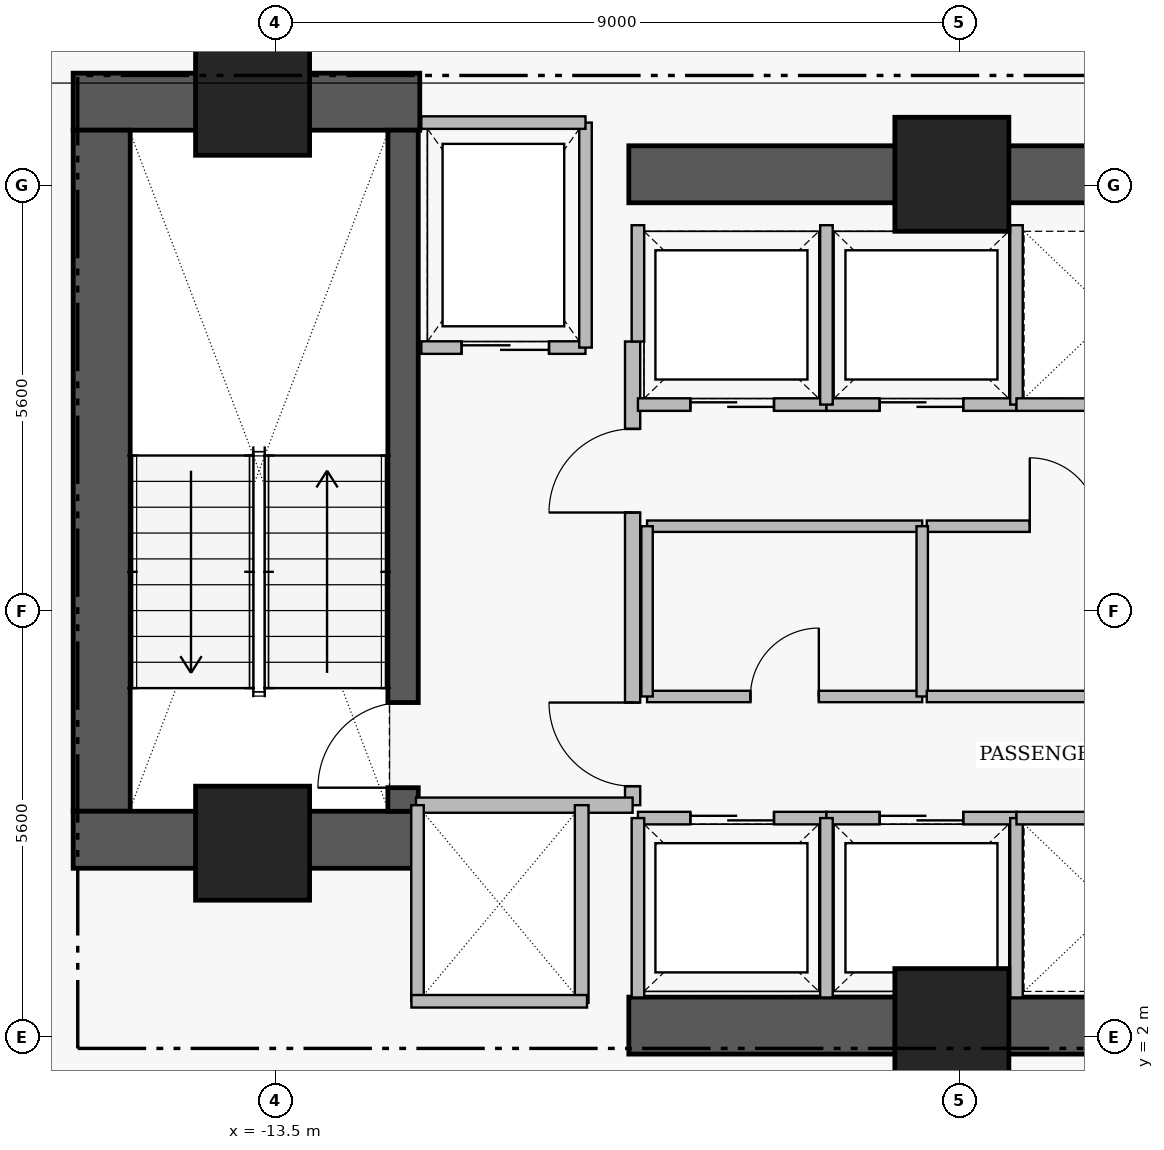
"""IFC4 building model, lengths in metres.
Left out: names, types, materials, properties, quantities, classifications, styles, units other than length and angle.
Written with IfcOpenShell. Run it as: python <this file> out.ifc"""

import sys

from ifc_helpers import new_model, si_unit, direction, frame, frame_2d, origin, origin_2d, place, context, subcontext, project, spatial, rectangle, extrude, element, fill, save


model = new_model("IFC4")
c1 = context("Model", 3, precision=1e-05, world=origin(), true_north=direction((0.0, 1.0)))
c2 = subcontext(c1, "Body", "Model", "MODEL_VIEW")
j1 = project(units=[si_unit("LENGTHUNIT", "METRE"), si_unit("PLANEANGLEUNIT", "RADIAN")], contexts=[c1])
p1 = place(None, origin())
s1 = spatial("IfcSite", under=j1, at=p1, CompositionType="ELEMENT")
p2 = place(p1, origin())
s2 = spatial("IfcBuilding", under=s1, at=p2, CompositionType="ELEMENT")
p3 = place(p2, frame((0.0, 0.0, 139.45)))
s3 = spatial("IfcBuildingStorey", under=s2, at=p3, CompositionType="ELEMENT", Elevation=139.45)
p4 = place(p3, frame((-16.16, 14.305, 0.0), z_axis=(0.0, 0.0, 1.0), x_axis=(1.0, 0.0, 0.0)))
e1 = element("IfcWall", 1, at=p4, inside=s3, PredefinedType="SHEAR", context=c2, shape_type="SweptSolid", body=[
    extrude(rectangle(XDim=4.56, YDim=0.75, at=frame_2d((2.28, 0.0))), origin(), (0.0, 0.0, 1.0), 3.46),
])
p5 = place(p3, frame((-15.785, 4.97, 0.0), z_axis=(0.0, 0.0, 1.0), x_axis=(0.0, 1.0, 0.0)))
e2 = element("IfcWall", 2, at=p5, inside=s3, PredefinedType="SHEAR", context=c2, shape_type="SweptSolid", body=[
    extrude(rectangle(XDim=8.96, YDim=0.75, at=frame_2d((4.48, 0.0))), origin(), (0.0, 0.0, 1.0), 3.46),
])
p6 = place(p3, frame((-16.16, 4.595, 0.0), z_axis=(0.0, 0.0, 1.0), x_axis=(1.0, 0.0, 0.0)))
e3 = element("IfcWall", 3, at=p6, inside=s3, PredefinedType="SHEAR", context=c2, shape_type="SweptSolid", body=[
    extrude(rectangle(XDim=4.56, YDim=0.75, at=frame_2d((2.28, 0.0))), origin(), (0.0, 0.0, 1.0), 3.46),
])
for number, where, z_axis, x_axis in (
    (4, (-8.85, 2.15, 0.0), (0.0, 0.0, 1.0), (1.0, 0.0, 0.0)),
    (5, (-8.85, 13.35, 0.0), (0.0, 0.0, 1.0), (1.0, 0.0, 0.0)),
):
    element("IfcWall", number, at=place(p3, frame(where, z_axis=z_axis, x_axis=x_axis)), inside=s3, PredefinedType="SHEAR", context=c2, shape_type="SweptSolid", body=[
        extrude(rectangle(XDim=7.6, YDim=0.75, at=frame_2d((3.8, 0.0))), origin(), (0.0, 0.0, 1.0), 3.43),
    ])
p7 = place(p3, frame((-11.82, 4.97, 0.0), z_axis=(0.0, 0.0, 1.0), x_axis=(0.0, 1.0, 0.0)))
e6 = element("IfcWall", 6, at=p7, inside=s3, PredefinedType="SHEAR", context=c2, shape_type="SweptSolid", body=[
    extrude(rectangle(XDim=8.96, YDim=0.4, at=frame_2d((4.48, 0.0))), origin(), (0.0, 0.0, 1.0), 3.46),
])
p8 = place(p7, frame((0.31, 0.0, 0.0)))
e7 = element("IfcOpeningElement", 7, at=p8, cuts=e6, PredefinedType="OPENING", context=c2, shape_type="SweptSolid", body=[
    extrude(rectangle(XDim=1.12, YDim=2.22, at=frame_2d((0.56, 1.11))), frame((0.0, 0.21, 0.0), z_axis=(0.0, -1.0, 0.0), x_axis=(1.0, 0.0, 0.0)), (0.0, 0.0, 1.0), 0.42),
])
for number, where, z_axis, x_axis in (
    (8, (-13.8, 14.35, 0.0), (0.0, 0.0, 1.0), (1.0, 0.0, 0.0)),
    (9, (-4.6, 13.35, 0.0), (0.0, 0.0, 1.0), (1.0, 0.0, 0.0)),
    (10, (-13.8, 4.55, 0.0), (0.0, 0.0, 1.0), (1.0, 0.0, 0.0)),
    (11, (-4.6, 2.15, 0.0), (0.0, 0.0, 1.0), (1.0, 0.0, 0.0)),
):
    element("IfcColumn", number, at=place(p3, frame(where, z_axis=z_axis, x_axis=x_axis)), inside=s3, PredefinedType="COLUMN", context=c2, shape_type="SweptSolid", body=[
        extrude(rectangle(XDim=1.5, YDim=1.5, at=origin_2d()), origin(), (0.0, 0.0, 1.0), 3.65),
    ])
p9 = place(p3, frame((-8.8, 5.05, 0.0), z_axis=(0.0, 0.0, 1.0), x_axis=(0.0, 1.0, 0.0)))
e12 = element("IfcWall", 12, at=p9, inside=s3, PredefinedType="PARTITIONING", context=c2, shape_type="SweptSolid", body=[
    extrude(rectangle(XDim=6.1, YDim=0.2, at=frame_2d((3.05, 0.0))), origin(), (0.0, 0.0, 1.0), 3.43),
])
p10 = place(p9, frame((0.25, 0.0, 0.0)))
e13 = element("IfcOpeningElement", 13, at=p10, cuts=e12, PredefinedType="OPENING", context=c2, shape_type="SweptSolid", body=[
    extrude(rectangle(XDim=1.1, YDim=2.2, at=frame_2d((0.55, 1.1))), frame((0.0, 0.11, 0.0), z_axis=(0.0, -1.0, 0.0), x_axis=(1.0, 0.0, 0.0)), (0.0, 0.0, 1.0), 0.22),
])
p11 = place(p9, frame((3.85, 0.0, 0.0)))
e14 = element("IfcOpeningElement", 14, at=p11, cuts=e12, PredefinedType="OPENING", context=c2, shape_type="SweptSolid", body=[
    extrude(rectangle(XDim=1.1, YDim=2.2, at=frame_2d((0.55, 1.1))), frame((0.0, 0.11, 0.0), z_axis=(0.0, -1.0, 0.0), x_axis=(1.0, 0.0, 0.0)), (0.0, 0.0, 1.0), 0.22),
])
p12 = place(p3, frame((-11.58, 11.07, 0.0), z_axis=(0.0, 0.0, 1.0), x_axis=(1.0, 0.0, 0.0)))
e15 = element("IfcWall", 15, at=p12, inside=s3, PredefinedType="PARTITIONING", context=c2, shape_type="SweptSolid", body=[
    extrude(rectangle(XDim=2.16, YDim=0.165, at=frame_2d((1.08, 0.0))), origin(), (0.0, 0.0, 1.0), 3.43),
])
p13 = place(p12, frame((0.53, 0.0, 0.0)))
e16 = element("IfcOpeningElement", 16, at=p13, cuts=e15, PredefinedType="OPENING", context=c2, shape_type="SweptSolid", body=[
    extrude(rectangle(XDim=1.15, YDim=2.25, at=frame_2d((0.575, 1.125))), frame((0.0, 0.093, 0.0), z_axis=(0.0, -1.0, 0.0), x_axis=(1.0, 0.0, 0.0)), (0.0, 0.0, 1.0), 0.185),
])
p14 = place(p3, frame((-8.73, 4.88, 0.0), z_axis=(0.0, 0.0, 1.0), x_axis=(1.0, 0.0, 0.0)))
e17 = element("IfcWall", 17, at=p14, inside=s3, PredefinedType="PARTITIONING", context=c2, shape_type="SweptSolid", body=[
    extrude(rectangle(XDim=2.48, YDim=0.165, at=frame_2d((1.24, 0.0))), origin(), (0.0, 0.0, 1.0), 3.43),
])
p15 = place(p14, frame((0.69, 0.0, 0.0)))
e18 = element("IfcOpeningElement", 18, at=p15, cuts=e17, PredefinedType="OPENING", context=c2, shape_type="SweptSolid", body=[
    extrude(rectangle(XDim=1.1, YDim=2.25, at=frame_2d((0.55, 1.125))), frame((0.0, 0.093, 0.0), z_axis=(0.0, -1.0, 0.0), x_axis=(1.0, 0.0, 0.0)), (0.0, 0.0, 1.0), 0.185),
])
p16 = place(p3, frame((-6.25, 4.88, 0.0), z_axis=(0.0, 0.0, 1.0), x_axis=(1.0, 0.0, 0.0)))
e19 = element("IfcWall", 19, at=p16, inside=s3, PredefinedType="PARTITIONING", context=c2, shape_type="SweptSolid", body=[
    extrude(rectangle(XDim=2.5, YDim=0.165, at=frame_2d((1.25, 0.0))), origin(), (0.0, 0.0, 1.0), 3.43),
])
p17 = place(p16, frame((0.7, 0.0, 0.0)))
e20 = element("IfcOpeningElement", 20, at=p17, cuts=e19, PredefinedType="OPENING", context=c2, shape_type="SweptSolid", body=[
    extrude(rectangle(XDim=1.1, YDim=2.25, at=frame_2d((0.55, 1.125))), frame((0.0, 0.093, 0.0), z_axis=(0.0, -1.0, 0.0), x_axis=(1.0, 0.0, 0.0)), (0.0, 0.0, 1.0), 0.185),
])
p18 = place(p3, frame((-8.73, 10.32, 0.0), z_axis=(0.0, 0.0, 1.0), x_axis=(1.0, 0.0, 0.0)))
e21 = element("IfcWall", 21, at=p18, inside=s3, PredefinedType="PARTITIONING", context=c2, shape_type="SweptSolid", body=[
    extrude(rectangle(XDim=2.48, YDim=0.165, at=frame_2d((1.24, 0.0))), origin(), (0.0, 0.0, 1.0), 3.43),
])
p19 = place(p18, frame((0.69, 0.0, 0.0)))
e22 = element("IfcOpeningElement", 22, at=p19, cuts=e21, PredefinedType="OPENING", context=c2, shape_type="SweptSolid", body=[
    extrude(rectangle(XDim=1.1, YDim=2.25, at=frame_2d((0.55, 1.125))), frame((0.0, 0.093, 0.0), z_axis=(0.0, -1.0, 0.0), x_axis=(1.0, 0.0, 0.0)), (0.0, 0.0, 1.0), 0.185),
])
p20 = place(p3, frame((-6.25, 10.32, 0.0), z_axis=(0.0, 0.0, 1.0), x_axis=(1.0, 0.0, 0.0)))
e23 = element("IfcWall", 23, at=p20, inside=s3, PredefinedType="PARTITIONING", context=c2, shape_type="SweptSolid", body=[
    extrude(rectangle(XDim=2.5, YDim=0.165, at=frame_2d((1.25, 0.0))), origin(), (0.0, 0.0, 1.0), 3.43),
])
p21 = place(p20, frame((0.7, 0.0, 0.0)))
e24 = element("IfcOpeningElement", 24, at=p21, cuts=e23, PredefinedType="OPENING", context=c2, shape_type="SweptSolid", body=[
    extrude(rectangle(XDim=1.1, YDim=2.25, at=frame_2d((0.55, 1.125))), frame((0.0, 0.093, 0.0), z_axis=(0.0, -1.0, 0.0), x_axis=(1.0, 0.0, 0.0)), (0.0, 0.0, 1.0), 0.185),
])
p22 = place(p3, frame((-8.61, 6.48, 0.0), z_axis=(0.0, 0.0, 1.0), x_axis=(1.0, 0.0, 0.0)))
e25 = element("IfcWall", 25, at=p22, inside=s3, PredefinedType="PARTITIONING", context=c2, shape_type="SweptSolid", body=[
    extrude(rectangle(XDim=3.62, YDim=0.15, at=frame_2d((1.81, 0.0))), origin(), (0.0, 0.0, 1.0), 3.43),
])
p23 = place(p22, frame((1.36, 0.0, 0.0)))
e26 = element("IfcOpeningElement", 26, at=p23, cuts=e25, PredefinedType="OPENING", context=c2, shape_type="SweptSolid", body=[
    extrude(rectangle(XDim=0.9, YDim=2.15, at=frame_2d((0.45, 1.075))), frame((0.0, 0.085, 0.0), z_axis=(0.0, -1.0, 0.0), x_axis=(1.0, 0.0, 0.0)), (0.0, 0.0, 1.0), 0.17),
])
p24 = place(p3, frame((-4.93, 8.72, 0.0), z_axis=(0.0, 0.0, 1.0), x_axis=(1.0, 0.0, 0.0)))
e27 = element("IfcWall", 27, at=p24, inside=s3, PredefinedType="PARTITIONING", context=c2, shape_type="SweptSolid", body=[
    extrude(rectangle(XDim=3.61, YDim=0.15, at=frame_2d((1.805, 0.0))), origin(), (0.0, 0.0, 1.0), 3.43),
])
p25 = place(p24, frame((1.355, 0.0, 0.0)))
e28 = element("IfcOpeningElement", 28, at=p25, cuts=e27, PredefinedType="OPENING", context=c2, shape_type="SweptSolid", body=[
    extrude(rectangle(XDim=0.9, YDim=2.15, at=frame_2d((0.45, 1.075))), frame((0.0, 0.085, 0.0), z_axis=(0.0, -1.0, 0.0), x_axis=(1.0, 0.0, 0.0)), (0.0, 0.0, 1.0), 0.17),
])
p26 = place(p3, frame((-11.65, 5.05, 0.0), z_axis=(0.0, 0.0, 1.0), x_axis=(1.0, 0.0, 0.0)))
e29 = element("IfcWall", 29, at=p26, inside=s3, PredefinedType="PARTITIONING", context=c2, shape_type="SweptSolid", body=[
    extrude(rectangle(XDim=2.85, YDim=0.2, at=frame_2d((1.425, 0.0))), origin(), (0.0, 0.0, 1.0), 3.43),
])
p27 = place(p3, frame((-9.42, 11.07, 0.0), z_axis=(0.0, 0.0, 1.0), x_axis=(0.0, 1.0, 0.0)))
e30 = element("IfcWall", 30, at=p27, inside=s3, PredefinedType="PARTITIONING", context=c2, shape_type="SweptSolid", body=[
    extrude(rectangle(XDim=2.96, YDim=0.165, at=frame_2d((1.48, 0.0))), origin(), (0.0, 0.0, 1.0), 3.43),
])
p28 = place(p3, frame((-11.58, 14.03, 0.0), z_axis=(0.0, 0.0, 1.0), x_axis=(1.0, 0.0, 0.0)))
e31 = element("IfcWall", 31, at=p28, inside=s3, PredefinedType="PARTITIONING", context=c2, shape_type="SweptSolid", body=[
    extrude(rectangle(XDim=2.16, YDim=0.165, at=frame_2d((1.08, 0.0))), origin(), (0.0, 0.0, 1.0), 3.43),
])
for number, where, z_axis, x_axis in (
    (32, (-8.73, 2.52, 0.0), (0.0, 0.0, 1.0), (0.0, 1.0, 0.0)),
    (33, (-6.25, 2.52, 0.0), (0.0, 0.0, 1.0), (0.0, 1.0, 0.0)),
    (34, (-3.75, 2.52, 0.0), (0.0, 0.0, 1.0), (0.0, 1.0, 0.0)),
):
    element("IfcWall", number, at=place(p3, frame(where, z_axis=z_axis, x_axis=x_axis)), inside=s3, PredefinedType="PARTITIONING", context=c2, shape_type="SweptSolid", body=[
        extrude(rectangle(XDim=2.36, YDim=0.165, at=frame_2d((1.18, 0.0))), origin(), (0.0, 0.0, 1.0), 3.43),
    ])
p29 = place(p3, frame((-8.73, 11.15, 0.0), z_axis=(0.0, 0.0, 1.0), x_axis=(0.0, 1.0, 0.0)))
e35 = element("IfcWall", 35, at=p29, inside=s3, PredefinedType="PARTITIONING", context=c2, shape_type="SweptSolid", body=[
    extrude(rectangle(XDim=1.53, YDim=0.165, at=frame_2d((0.765, 0.0))), origin(), (0.0, 0.0, 1.0), 3.43),
])
for number, where, z_axis, x_axis in (
    (36, (-6.25, 10.32, 0.0), (0.0, 0.0, 1.0), (0.0, 1.0, 0.0)),
    (37, (-3.75, 10.32, 0.0), (0.0, 0.0, 1.0), (0.0, 1.0, 0.0)),
):
    element("IfcWall", number, at=place(p3, frame(where, z_axis=z_axis, x_axis=x_axis)), inside=s3, PredefinedType="PARTITIONING", context=c2, shape_type="SweptSolid", body=[
        extrude(rectangle(XDim=2.36, YDim=0.165, at=frame_2d((1.18, 0.0))), origin(), (0.0, 0.0, 1.0), 3.43),
    ])
for number, where, z_axis, x_axis in (
    (38, (-3.75, 4.88, 0.0), (0.0, 0.0, 1.0), (1.0, 0.0, 0.0)),
    (39, (-3.75, 10.32, 0.0), (0.0, 0.0, 1.0), (1.0, 0.0, 0.0)),
):
    element("IfcWall", number, at=place(p3, frame(where, z_axis=z_axis, x_axis=x_axis)), inside=s3, PredefinedType="PARTITIONING", context=c2, shape_type="SweptSolid", body=[
        extrude(rectangle(XDim=2.48, YDim=0.165, at=frame_2d((1.24, 0.0))), origin(), (0.0, 0.0, 1.0), 3.43),
    ])
p30 = place(p3, frame((-9.47, 2.45, 0.0), z_axis=(0.0, 0.0, 1.0), x_axis=(0.0, 1.0, 0.0)))
e40 = element("IfcWall", 40, at=p30, inside=s3, PredefinedType="PARTITIONING", context=c2, shape_type="SweptSolid", body=[
    extrude(rectangle(XDim=2.6, YDim=0.18, at=frame_2d((1.3, 0.0))), origin(), (0.0, 0.0, 1.0), 3.43),
])
p31 = place(p3, frame((-11.63, 2.47, 0.0), z_axis=(0.0, 0.0, 1.0), x_axis=(0.0, 1.0, 0.0)))
e41 = element("IfcWall", 41, at=p31, inside=s3, PredefinedType="PARTITIONING", context=c2, shape_type="SweptSolid", body=[
    extrude(rectangle(XDim=2.58, YDim=0.165, at=frame_2d((1.29, 0.0))), origin(), (0.0, 0.0, 1.0), 3.43),
])
p32 = place(p3, frame((-11.71, 2.47, 0.0), z_axis=(0.0, 0.0, 1.0), x_axis=(1.0, 0.0, 0.0)))
e42 = element("IfcWall", 42, at=p32, inside=s3, PredefinedType="PARTITIONING", context=c2, shape_type="SweptSolid", body=[
    extrude(rectangle(XDim=2.31, YDim=0.165, at=frame_2d((1.155, 0.0))), origin(), (0.0, 0.0, 1.0), 2.03),
])
p33 = place(p3, frame((-8.61, 8.72, 0.0), z_axis=(0.0, 0.0, 1.0), x_axis=(1.0, 0.0, 0.0)))
e43 = element("IfcWall", 43, at=p33, inside=s3, PredefinedType="PARTITIONING", context=c2, shape_type="SweptSolid", body=[
    extrude(rectangle(XDim=3.62, YDim=0.15, at=frame_2d((1.81, 0.0))), origin(), (0.0, 0.0, 1.0), 3.43),
])
for number, where, z_axis, x_axis in (
    (44, (-8.61, 6.48, 0.0), (0.0, 0.0, 1.0), (0.0, 1.0, 0.0)),
    (45, (-4.99, 6.48, 0.0), (0.0, 0.0, 1.0), (0.0, 1.0, 0.0)),
):
    element("IfcWall", number, at=place(p3, frame(where, z_axis=z_axis, x_axis=x_axis)), inside=s3, PredefinedType="PARTITIONING", context=c2, shape_type="SweptSolid", body=[
        extrude(rectangle(XDim=2.24, YDim=0.15, at=frame_2d((1.12, 0.0))), origin(), (0.0, 0.0, 1.0), 3.43),
    ])
p34 = place(p3, frame((-4.93, 6.48, 0.0), z_axis=(0.0, 0.0, 1.0), x_axis=(1.0, 0.0, 0.0)))
e46 = element("IfcWall", 46, at=p34, inside=s3, PredefinedType="PARTITIONING", context=c2, shape_type="SweptSolid", body=[
    extrude(rectangle(XDim=3.61, YDim=0.15, at=frame_2d((1.805, 0.0))), origin(), (0.0, 0.0, 1.0), 3.43),
])
p35 = place(p8, origin())
e47 = element("IfcDoor", 47, at=p35, inside=s3, OperationType="SINGLE_SWING_LEFT", PredefinedType="DOOR", context=c2, shape_type="SweptSolid", body=[
    extrude(rectangle(XDim=1.12, YDim=2.22, at=frame_2d((0.56, 1.11))), frame((0.0, 0.025, 0.0), z_axis=(0.0, -1.0, 0.0), x_axis=(1.0, 0.0, 0.0)), (0.0, 0.0, 1.0), 0.05),
])
fill(e7, e47)
p36 = place(p10, origin())
e48 = element("IfcDoor", 48, at=p36, inside=s3, OperationType="SINGLE_SWING_RIGHT", PredefinedType="DOOR", context=c2, shape_type="SweptSolid", body=[
    extrude(rectangle(XDim=1.1, YDim=2.2, at=frame_2d((0.55, 1.1))), frame((0.0, 0.025, 0.0), z_axis=(0.0, -1.0, 0.0), x_axis=(1.0, 0.0, 0.0)), (0.0, 0.0, 1.0), 0.05),
])
fill(e13, e48)
p37 = place(p11, origin())
e49 = element("IfcDoor", 49, at=p37, inside=s3, OperationType="SINGLE_SWING_LEFT", PredefinedType="DOOR", context=c2, shape_type="SweptSolid", body=[
    extrude(rectangle(XDim=1.1, YDim=2.2, at=frame_2d((0.55, 1.1))), frame((0.0, 0.025, 0.0), z_axis=(0.0, -1.0, 0.0), x_axis=(1.0, 0.0, 0.0)), (0.0, 0.0, 1.0), 0.05),
])
fill(e14, e49)
p38 = place(p13, origin())
e50 = element("IfcDoor", 50, at=p38, inside=s3, OperationType="SLIDING_TO_LEFT", PredefinedType="DOOR", context=c2, shape_type="SweptSolid", body=[
    extrude(rectangle(XDim=1.15, YDim=2.25, at=frame_2d((0.575, 1.125))), frame((0.0, 0.025, 0.0), z_axis=(0.0, -1.0, 0.0), x_axis=(1.0, 0.0, 0.0)), (0.0, 0.0, 1.0), 0.05),
])
fill(e16, e50)
p39 = place(p15, origin())
e51 = element("IfcDoor", 51, at=p39, inside=s3, OperationType="SLIDING_TO_LEFT", PredefinedType="DOOR", context=c2, shape_type="SweptSolid", body=[
    extrude(rectangle(XDim=1.1, YDim=2.25, at=frame_2d((0.55, 1.125))), frame((0.0, 0.025, 0.0), z_axis=(0.0, -1.0, 0.0), x_axis=(1.0, 0.0, 0.0)), (0.0, 0.0, 1.0), 0.05),
])
fill(e18, e51)
p40 = place(p17, origin())
e52 = element("IfcDoor", 52, at=p40, inside=s3, OperationType="SLIDING_TO_LEFT", PredefinedType="DOOR", context=c2, shape_type="SweptSolid", body=[
    extrude(rectangle(XDim=1.1, YDim=2.25, at=frame_2d((0.55, 1.125))), frame((0.0, 0.025, 0.0), z_axis=(0.0, -1.0, 0.0), x_axis=(1.0, 0.0, 0.0)), (0.0, 0.0, 1.0), 0.05),
])
fill(e20, e52)
p41 = place(p19, origin())
e53 = element("IfcDoor", 53, at=p41, inside=s3, OperationType="SLIDING_TO_LEFT", PredefinedType="DOOR", context=c2, shape_type="SweptSolid", body=[
    extrude(rectangle(XDim=1.1, YDim=2.25, at=frame_2d((0.55, 1.125))), frame((0.0, 0.025, 0.0), z_axis=(0.0, -1.0, 0.0), x_axis=(1.0, 0.0, 0.0)), (0.0, 0.0, 1.0), 0.05),
])
fill(e22, e53)
p42 = place(p21, origin())
e54 = element("IfcDoor", 54, at=p42, inside=s3, OperationType="SLIDING_TO_LEFT", PredefinedType="DOOR", context=c2, shape_type="SweptSolid", body=[
    extrude(rectangle(XDim=1.1, YDim=2.25, at=frame_2d((0.55, 1.125))), frame((0.0, 0.025, 0.0), z_axis=(0.0, -1.0, 0.0), x_axis=(1.0, 0.0, 0.0)), (0.0, 0.0, 1.0), 0.05),
])
fill(e24, e54)
p43 = place(p23, origin())
e55 = element("IfcDoor", 55, at=p43, inside=s3, OperationType="SINGLE_SWING_RIGHT", PredefinedType="DOOR", context=c2, shape_type="SweptSolid", body=[
    extrude(rectangle(XDim=0.9, YDim=2.15, at=frame_2d((0.45, 1.075))), frame((0.0, 0.025, 0.0), z_axis=(0.0, -1.0, 0.0), x_axis=(1.0, 0.0, 0.0)), (0.0, 0.0, 1.0), 0.05),
])
fill(e26, e55)
p44 = place(p25, origin())
e56 = element("IfcDoor", 56, at=p44, inside=s3, OperationType="SINGLE_SWING_LEFT", PredefinedType="DOOR", context=c2, shape_type="SweptSolid", body=[
    extrude(rectangle(XDim=0.9, YDim=2.15, at=frame_2d((0.45, 1.075))), frame((0.0, 0.025, 0.0), z_axis=(0.0, -1.0, 0.0), x_axis=(1.0, 0.0, 0.0)), (0.0, 0.0, 1.0), 0.05),
])
fill(e28, e56)
save(model, sys.argv[1])
